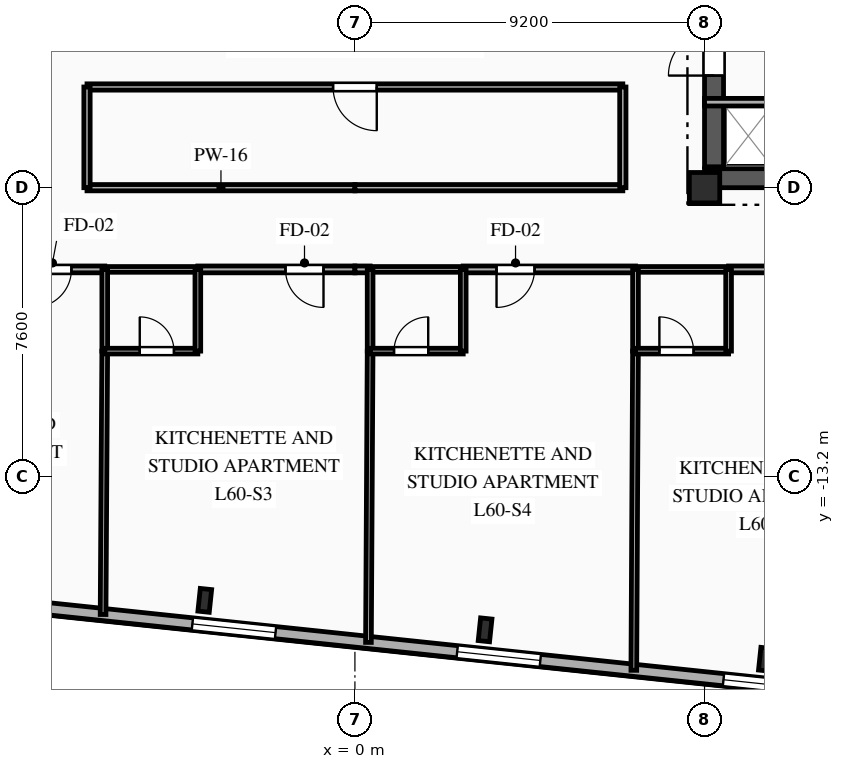
"""IFC4 building model, lengths in metres.
Left out: names, types, materials, properties, quantities, classifications, styles, units other than length and angle.
Written with IfcOpenShell. Run it as: python <this file> out.ifc"""

import sys

from ifc_helpers import new_model, si_unit, direction, frame, frame_2d, origin, origin_2d, place, context, subcontext, project, spatial, rectangle, i_section, extrude, element, fill, save


model = new_model("IFC4")
c1 = context("Model", 3, precision=1e-05, world=origin(), true_north=direction((0.0, 1.0)))
c2 = subcontext(c1, "Body", "Model", "MODEL_VIEW")
j1 = project(units=[si_unit("LENGTHUNIT", "METRE"), si_unit("PLANEANGLEUNIT", "RADIAN")], contexts=[c1])
p1 = place(None, origin())
s1 = spatial("IfcSite", under=j1, at=p1, CompositionType="ELEMENT")
p2 = place(p1, origin())
s2 = spatial("IfcBuilding", under=s1, at=p2, CompositionType="ELEMENT")
p3 = place(p2, frame((0.0, 0.0, 213.15)))
s3 = spatial("IfcBuildingStorey", under=s2, at=p3, CompositionType="ELEMENT", Elevation=213.15)
p4 = place(p3, frame((9.2, -5.6, 0.0), z_axis=(0.0, 0.0, 1.0), x_axis=(1.0, 0.0, 0.0)))
e1 = element("IfcColumn", 1, at=p4, inside=s3, PredefinedType="COLUMN", context=c2, shape_type="SweptSolid", body=[
    extrude(rectangle(XDim=0.8, YDim=0.8, at=origin_2d()), origin(), (0.0, 0.0, 1.0), 3.35),
])
for number, where, z_axis, x_axis in (
    (2, (-3.951, -16.458, 0.0), (0.0, 0.0, 1.0), (0.995, -0.105, 0.0)),
    (3, (3.425, -17.233, 0.0), (0.0, 0.0, 1.0), (0.995, -0.105, 0.0)),
    (4, (10.801, -18.009, 0.0), (0.0, 0.0, 1.0), (0.995, -0.105, 0.0)),
):
    element("IfcColumn", number, at=place(p3, frame(where, z_axis=z_axis, x_axis=x_axis)), inside=s3, PredefinedType="COLUMN", context=c2, shape_type="SweptSolid", body=[
        extrude(i_section(OverallWidth=0.3, OverallDepth=0.6, WebThickness=0.015, FlangeThickness=0.03, FilletRadius=0.027, at=origin_2d()), origin(), (0.0, 0.0, 1.0), 3.35),
    ])
p5 = place(p3, frame((18.756, -19.498, 0.0), z_axis=(0.0, 0.0, 1.0), x_axis=(-0.994522060044, 0.104526896475, 0.0)))
e5 = element("IfcWall", 5, at=p5, inside=s3, PredefinedType="SOLIDWALL", context=c2, shape_type="SweptSolid", body=[
    extrude(rectangle(XDim=45.8, YDim=0.32, at=frame_2d((22.9, 0.0))), origin(), (0.0, 0.0, 1.0), 3.04),
])
p6 = place(p5, frame((1.657, 0.0, 0.85)))
e6 = element("IfcOpeningElement", 6, at=p6, cuts=e5, PredefinedType="OPENING", context=c2, shape_type="SweptSolid", body=[
    extrude(rectangle(XDim=1.65, YDim=1.85, at=frame_2d((0.825, 0.925))), frame((0.0, 0.17, 0.0), z_axis=(0.0, -1.0, 0.0), x_axis=(1.0, 0.0, 0.0)), (0.0, 0.0, 1.0), 0.34),
])
p7 = place(p5, frame((6.907, 0.0, 0.85)))
e7 = element("IfcOpeningElement", 7, at=p7, cuts=e5, PredefinedType="OPENING", context=c2, shape_type="SweptSolid", body=[
    extrude(rectangle(XDim=2.2, YDim=1.85, at=frame_2d((1.1, 0.925))), frame((0.0, 0.17, 0.0), z_axis=(0.0, -1.0, 0.0), x_axis=(1.0, 0.0, 0.0)), (0.0, 0.0, 1.0), 0.34),
])
p8 = place(p5, frame((13.953, 0.0, 0.85)))
e8 = element("IfcOpeningElement", 8, at=p8, cuts=e5, PredefinedType="OPENING", context=c2, shape_type="SweptSolid", body=[
    extrude(rectangle(XDim=2.2, YDim=1.85, at=frame_2d((1.1, 0.925))), frame((0.0, 0.17, 0.0), z_axis=(0.0, -1.0, 0.0), x_axis=(1.0, 0.0, 0.0)), (0.0, 0.0, 1.0), 0.34),
])
p9 = place(p5, frame((20.959, 0.0, 0.85)))
e9 = element("IfcOpeningElement", 9, at=p9, cuts=e5, PredefinedType="OPENING", context=c2, shape_type="SweptSolid", body=[
    extrude(rectangle(XDim=2.2, YDim=1.85, at=frame_2d((1.1, 0.925))), frame((0.0, 0.17, 0.0), z_axis=(0.0, -1.0, 0.0), x_axis=(1.0, 0.0, 0.0)), (0.0, 0.0, 1.0), 0.34),
])
p10 = place(p5, frame((27.965, 0.0, 0.85)))
e10 = element("IfcOpeningElement", 10, at=p10, cuts=e5, PredefinedType="OPENING", context=c2, shape_type="SweptSolid", body=[
    extrude(rectangle(XDim=2.2, YDim=1.85, at=frame_2d((1.1, 0.925))), frame((0.0, 0.17, 0.0), z_axis=(0.0, -1.0, 0.0), x_axis=(1.0, 0.0, 0.0)), (0.0, 0.0, 1.0), 0.34),
])
p11 = place(p5, frame((35.487, 0.0, 0.85)))
e11 = element("IfcOpeningElement", 11, at=p11, cuts=e5, PredefinedType="OPENING", context=c2, shape_type="SweptSolid", body=[
    extrude(rectangle(XDim=1.65, YDim=1.85, at=frame_2d((0.825, 0.925))), frame((0.0, 0.17, 0.0), z_axis=(0.0, -1.0, 0.0), x_axis=(1.0, 0.0, 0.0)), (0.0, 0.0, 1.0), 0.34),
])
p12 = place(p5, frame((41.212, 0.0, 0.85)))
e12 = element("IfcOpeningElement", 12, at=p12, cuts=e5, PredefinedType="OPENING", context=c2, shape_type="SweptSolid", body=[
    extrude(rectangle(XDim=1.65, YDim=1.85, at=frame_2d((0.825, 0.925))), frame((0.0, 0.17, 0.0), z_axis=(0.0, -1.0, 0.0), x_axis=(1.0, 0.0, 0.0)), (0.0, 0.0, 1.0), 0.34),
])
p13 = place(p3, frame((9.2, -5.35, 0.0), z_axis=(0.0, 0.0, 1.0), x_axis=(1.0, 0.0, 0.0)))
e13 = element("IfcWall", 13, at=p13, inside=s3, PredefinedType="SHEAR", context=c2, shape_type="SweptSolid", body=[
    extrude(rectangle(XDim=9.6, YDim=0.5, at=frame_2d((4.8, 0.0))), origin(), (0.0, 0.0, 1.0), 3.04),
])
p14 = place(p13, frame((7.65, 0.0, 0.0)))
e14 = element("IfcOpeningElement", 14, at=p14, cuts=e13, PredefinedType="OPENING", context=c2, shape_type="SweptSolid", body=[
    extrude(rectangle(XDim=0.9, YDim=2.1, at=frame_2d((0.45, 1.05))), frame((0.0, 0.26, 0.0), z_axis=(0.0, -1.0, 0.0), x_axis=(1.0, 0.0, 0.0)), (0.0, 0.0, 1.0), 0.52),
])
p15 = place(p3, frame((9.45, -5.05, 0.0), z_axis=(0.0, 0.0, 1.0), x_axis=(0.0, 1.0, 0.0)))
e15 = element("IfcWall", 15, at=p15, inside=s3, PredefinedType="SHEAR", context=c2, shape_type="SweptSolid", body=[
    extrude(rectangle(XDim=10.1, YDim=0.5, at=frame_2d((5.05, 0.0))), origin(), (0.0, 0.0, 1.0), 3.04),
])
p16 = place(p15, frame((7.15, 0.0, 0.0)))
e16 = element("IfcOpeningElement", 16, at=p16, cuts=e15, PredefinedType="OPENING", context=c2, shape_type="SweptSolid", body=[
    extrude(rectangle(XDim=0.9, YDim=2.1, at=frame_2d((0.45, 1.05))), frame((0.0, 0.26, 0.0), z_axis=(0.0, -1.0, 0.0), x_axis=(1.0, 0.0, 0.0)), (0.0, 0.0, 1.0), 0.52),
])
p17 = place(p15, frame((2.4, 0.0, 0.0)))
e17 = element("IfcOpeningElement", 17, at=p17, cuts=e15, PredefinedType="OPENING", context=c2, shape_type="SweptSolid", body=[
    extrude(rectangle(XDim=1.2, YDim=2.15, at=frame_2d((0.6, 1.075))), frame((0.0, 0.26, 0.0), z_axis=(0.0, -1.0, 0.0), x_axis=(1.0, 0.0, 0.0)), (0.0, 0.0, 1.0), 0.52),
])
p18 = place(p3, frame((9.2, -3.35, 0.0), z_axis=(0.0, 0.0, 1.0), x_axis=(1.0, 0.0, 0.0)))
e18 = element("IfcWall", 18, at=p18, inside=s3, PredefinedType="PARTITIONING", context=c2, shape_type="SweptSolid", body=[
    extrude(rectangle(XDim=1.88, YDim=0.2, at=frame_2d((0.94, 0.0))), origin(), (0.0, 0.0, 1.0), 2.755),
])
p19 = place(p3, frame((-6.583, -7.75, 0.0), z_axis=(0.0, 0.0, 1.0), x_axis=(-1.0, 0.0, 0.0)))
e19 = element("IfcWall", 19, at=p19, inside=s3, PredefinedType="PARTITIONING", context=c2, shape_type="SweptSolid", body=[
    extrude(rectangle(XDim=4.534, YDim=0.18, at=frame_2d((2.267, 0.0))), origin(), (0.0, 0.0, 1.0), 3.04),
])
p20 = place(p19, frame((0.877, 0.0, 0.0)))
e20 = element("IfcOpeningElement", 20, at=p20, cuts=e19, PredefinedType="OPENING", context=c2, shape_type="SweptSolid", body=[
    extrude(rectangle(XDim=1.0, YDim=2.15, at=frame_2d((0.5, 1.075))), frame((0.0, 0.1, 0.0), z_axis=(0.0, -1.0, 0.0), x_axis=(1.0, 0.0, 0.0)), (0.0, 0.0, 1.0), 0.2),
])
p21 = place(p3, frame((0.0, -7.75, 0.0), z_axis=(0.0, 0.0, 1.0), x_axis=(-1.0, 0.0, 0.0)))
e21 = element("IfcWall", 21, at=p21, inside=s3, PredefinedType="PARTITIONING", context=c2, shape_type="SweptSolid", body=[
    extrude(rectangle(XDim=4.133, YDim=0.18, at=frame_2d((2.066, 0.0))), origin(), (0.0, 0.0, 1.0), 3.04),
])
p22 = place(p21, frame((0.827, 0.0, 0.0)))
e22 = element("IfcOpeningElement", 22, at=p22, cuts=e21, PredefinedType="OPENING", context=c2, shape_type="SweptSolid", body=[
    extrude(rectangle(XDim=1.0, YDim=2.15, at=frame_2d((0.5, 1.075))), frame((0.0, 0.1, 0.0), z_axis=(0.0, -1.0, 0.0), x_axis=(1.0, 0.0, 0.0)), (0.0, 0.0, 1.0), 0.2),
])
p23 = place(p3, frame((-4.133, -7.75, 0.0), z_axis=(0.0, 0.0, 1.0), x_axis=(-1.0, 0.0, 0.0)))
e23 = element("IfcWall", 23, at=p23, inside=s3, PredefinedType="PLUMBINGWALL", context=c2, shape_type="SweptSolid", body=[
    extrude(rectangle(XDim=2.45, YDim=0.15, at=frame_2d((1.225, 0.0))), origin(), (0.0, 0.0, 1.0), 3.04),
])
p24 = place(p3, frame((-7.05, -5.6, 0.0), z_axis=(0.0, 0.0, 1.0), x_axis=(1.0, 0.0, 0.0)))
e24 = element("IfcWall", 24, at=p24, inside=s3, PredefinedType="PARTITIONING", context=c2, shape_type="SweptSolid", body=[
    extrude(rectangle(XDim=7.05, YDim=0.165, at=frame_2d((3.525, 0.0))), origin(), (0.0, 0.0, 1.0), 2.525),
])
p25 = place(p3, frame((0.4, -7.75, 0.0), z_axis=(0.0, 0.0, 1.0), x_axis=(-1.0, 0.0, 0.0)))
e25 = element("IfcWall", 25, at=p25, inside=s3, PredefinedType="PARTITIONING", context=c2, shape_type="SweptSolid", body=[
    extrude(rectangle(XDim=0.4, YDim=0.18, at=frame_2d((0.2, 0.0))), origin(), (0.0, 0.0, 1.0), 3.04),
])
p26 = place(p3, frame((7.383, -7.75, 0.0), z_axis=(0.0, 0.0, 1.0), x_axis=(-1.0, 0.0, 0.0)))
e26 = element("IfcWall", 26, at=p26, inside=s3, PredefinedType="PARTITIONING", context=c2, shape_type="SweptSolid", body=[
    extrude(rectangle(XDim=4.533, YDim=0.18, at=frame_2d((2.267, 0.0))), origin(), (0.0, 0.0, 1.0), 3.04),
])
p27 = place(p26, frame((2.656, 0.0, 0.0)))
e27 = element("IfcOpeningElement", 27, at=p27, cuts=e26, PredefinedType="OPENING", context=c2, shape_type="SweptSolid", body=[
    extrude(rectangle(XDim=1.0, YDim=2.15, at=frame_2d((0.5, 1.075))), frame((0.0, 0.1, 0.0), z_axis=(0.0, -1.0, 0.0), x_axis=(1.0, 0.0, 0.0)), (0.0, 0.0, 1.0), 0.2),
])
p28 = place(p3, frame((2.85, -7.75, 0.0), z_axis=(0.0, 0.0, 1.0), x_axis=(-1.0, 0.0, 0.0)))
e28 = element("IfcWall", 28, at=p28, inside=s3, PredefinedType="PLUMBINGWALL", context=c2, shape_type="SweptSolid", body=[
    extrude(rectangle(XDim=2.45, YDim=0.15, at=frame_2d((1.225, 0.0))), origin(), (0.0, 0.0, 1.0), 3.04),
])
p29 = place(p3, frame((14.367, -7.75, 0.0), z_axis=(0.0, 0.0, 1.0), x_axis=(-1.0, 0.0, 0.0)))
e29 = element("IfcWall", 29, at=p29, inside=s3, PredefinedType="PARTITIONING", context=c2, shape_type="SweptSolid", body=[
    extrude(rectangle(XDim=4.534, YDim=0.18, at=frame_2d((2.267, 0.0))), origin(), (0.0, 0.0, 1.0), 3.04),
])
p30 = place(p29, frame((0.877, 0.0, 0.0)))
e30 = element("IfcOpeningElement", 30, at=p30, cuts=e29, PredefinedType="OPENING", context=c2, shape_type="SweptSolid", body=[
    extrude(rectangle(XDim=1.0, YDim=2.15, at=frame_2d((0.5, 1.075))), frame((0.0, 0.1, 0.0), z_axis=(0.0, -1.0, 0.0), x_axis=(1.0, 0.0, 0.0)), (0.0, 0.0, 1.0), 0.2),
])
p31 = place(p3, frame((9.833, -7.75, 0.0), z_axis=(0.0, 0.0, 1.0), x_axis=(-1.0, 0.0, 0.0)))
e31 = element("IfcWall", 31, at=p31, inside=s3, PredefinedType="PLUMBINGWALL", context=c2, shape_type="SweptSolid", body=[
    extrude(rectangle(XDim=2.45, YDim=0.15, at=frame_2d((1.225, 0.0))), origin(), (0.0, 0.0, 1.0), 3.04),
])
p32 = place(p3, frame((0.0, -5.6, 0.0), z_axis=(0.0, 0.0, 1.0), x_axis=(1.0, 0.0, 0.0)))
e32 = element("IfcWall", 32, at=p32, inside=s3, PredefinedType="PARTITIONING", context=c2, shape_type="SweptSolid", body=[
    extrude(rectangle(XDim=7.05, YDim=0.165, at=frame_2d((3.525, 0.0))), origin(), (0.0, 0.0, 1.0), 2.525),
])
p33 = place(p3, frame((7.05, -2.95, 0.0), z_axis=(0.0, 0.0, 1.0), x_axis=(-1.0, 0.0, 0.0)))
e33 = element("IfcWall", 33, at=p33, inside=s3, PredefinedType="PARTITIONING", context=c2, shape_type="SweptSolid", body=[
    extrude(rectangle(XDim=14.1, YDim=0.165, at=frame_2d((7.05, 0.0))), origin(), (0.0, 0.0, 1.0), 3.04),
])
p34 = place(p33, frame((6.475, 0.0, 0.0)))
e34 = element("IfcOpeningElement", 34, at=p34, cuts=e33, PredefinedType="OPENING", context=c2, shape_type="SweptSolid", body=[
    extrude(rectangle(XDim=1.15, YDim=2.15, at=frame_2d((0.575, 1.075))), frame((0.0, 0.093, 0.0), z_axis=(0.0, -1.0, 0.0), x_axis=(1.0, 0.0, 0.0)), (0.0, 0.0, 1.0), 0.185),
])
for number, where, z_axis, x_axis in (
    (35, (-7.05, -2.95, 0.0), (0.0, 0.0, 1.0), (0.0, -1.0, 0.0)),
    (36, (7.05, -5.6, 0.0), (0.0, 0.0, 1.0), (0.0, 1.0, 0.0)),
):
    element("IfcWall", number, at=place(p3, frame(where, z_axis=z_axis, x_axis=x_axis)), inside=s3, PredefinedType="PARTITIONING", context=c2, shape_type="SweptSolid", body=[
        extrude(rectangle(XDim=2.65, YDim=0.165, at=frame_2d((1.325, 0.0))), origin(), (0.0, 0.0, 1.0), 3.04),
    ])
p35 = place(p3, frame((-6.583, -9.9, 0.0), z_axis=(0.0, 0.0, 1.0), x_axis=(-0.006340579882, -0.999979898321, 0.0)))
e37 = element("IfcWall", 37, at=p35, inside=s3, PredefinedType="PARTITIONING", context=c2, shape_type="SweptSolid", body=[
    extrude(rectangle(XDim=6.931, YDim=0.15, at=frame_2d((3.465, 0.0))), origin(), (0.0, 0.0, 1.0), 3.04),
])
p36 = place(p3, frame((-6.583, -7.75, 0.0), z_axis=(0.0, 0.0, 1.0), x_axis=(0.0, -1.0, 0.0)))
e38 = element("IfcWall", 38, at=p36, inside=s3, PredefinedType="PLUMBINGWALL", context=c2, shape_type="SweptSolid", body=[
    extrude(rectangle(XDim=2.15, YDim=0.15, at=frame_2d((1.075, 0.0))), origin(), (0.0, 0.0, 1.0), 3.04),
])
p37 = place(p3, frame((-6.583, -9.9, 0.0), z_axis=(0.0, 0.0, 1.0), x_axis=(1.0, 0.0, 0.0)))
e39 = element("IfcWall", 39, at=p37, inside=s3, PredefinedType="PLUMBINGWALL", context=c2, shape_type="SweptSolid", body=[
    extrude(rectangle(XDim=2.45, YDim=0.15, at=frame_2d((1.225, 0.0))), origin(), (0.0, 0.0, 1.0), 3.04),
])
p38 = place(p37, frame((0.921, 0.0, 0.0)))
e40 = element("IfcOpeningElement", 40, at=p38, cuts=e39, PredefinedType="OPENING", context=c2, shape_type="SweptSolid", body=[
    extrude(rectangle(XDim=0.9, YDim=2.1, at=frame_2d((0.45, 1.05))), frame((0.0, 0.085, 0.0), z_axis=(0.0, -1.0, 0.0), x_axis=(1.0, 0.0, 0.0)), (0.0, 0.0, 1.0), 0.17),
])
p39 = place(p3, frame((-4.133, -9.9, 0.0), z_axis=(0.0, 0.0, 1.0), x_axis=(0.0, 1.0, 0.0)))
e41 = element("IfcWall", 41, at=p39, inside=s3, PredefinedType="PLUMBINGWALL", context=c2, shape_type="SweptSolid", body=[
    extrude(rectangle(XDim=2.15, YDim=0.15, at=frame_2d((1.075, 0.0))), origin(), (0.0, 0.0, 1.0), 3.04),
])
p40 = place(p3, frame((0.4, -9.9, 0.0), z_axis=(0.0, 0.0, 1.0), x_axis=(-0.005701633766, -0.999983745554, 0.0)))
e42 = element("IfcWall", 42, at=p40, inside=s3, PredefinedType="PARTITIONING", context=c2, shape_type="SweptSolid", body=[
    extrude(rectangle(XDim=7.665, YDim=0.15, at=frame_2d((3.833, 0.0))), origin(), (0.0, 0.0, 1.0), 3.04),
])
p41 = place(p3, frame((0.4, -7.75, 0.0), z_axis=(0.0, 0.0, 1.0), x_axis=(0.0, -1.0, 0.0)))
e43 = element("IfcWall", 43, at=p41, inside=s3, PredefinedType="PLUMBINGWALL", context=c2, shape_type="SweptSolid", body=[
    extrude(rectangle(XDim=2.15, YDim=0.15, at=frame_2d((1.075, 0.0))), origin(), (0.0, 0.0, 1.0), 3.04),
])
p42 = place(p3, frame((0.4, -9.9, 0.0), z_axis=(0.0, 0.0, 1.0), x_axis=(1.0, 0.0, 0.0)))
e44 = element("IfcWall", 44, at=p42, inside=s3, PredefinedType="PLUMBINGWALL", context=c2, shape_type="SweptSolid", body=[
    extrude(rectangle(XDim=2.45, YDim=0.15, at=frame_2d((1.225, 0.0))), origin(), (0.0, 0.0, 1.0), 3.04),
])
p43 = place(p42, frame((0.629, 0.0, 0.0)))
e45 = element("IfcOpeningElement", 45, at=p43, cuts=e44, PredefinedType="OPENING", context=c2, shape_type="SweptSolid", body=[
    extrude(rectangle(XDim=0.9, YDim=2.1, at=frame_2d((0.45, 1.05))), frame((0.0, 0.085, 0.0), z_axis=(0.0, -1.0, 0.0), x_axis=(1.0, 0.0, 0.0)), (0.0, 0.0, 1.0), 0.17),
])
p44 = place(p3, frame((2.85, -9.9, 0.0), z_axis=(0.0, 0.0, 1.0), x_axis=(0.0, 1.0, 0.0)))
e46 = element("IfcWall", 46, at=p44, inside=s3, PredefinedType="PLUMBINGWALL", context=c2, shape_type="SweptSolid", body=[
    extrude(rectangle(XDim=2.15, YDim=0.15, at=frame_2d((1.075, 0.0))), origin(), (0.0, 0.0, 1.0), 3.04),
])
p45 = place(p3, frame((7.383, -9.9, 0.0), z_axis=(0.0, 0.0, 1.0), x_axis=(-0.00523233441, -0.999986311245, 0.0)))
e47 = element("IfcWall", 47, at=p45, inside=s3, PredefinedType="PARTITIONING", context=c2, shape_type="SweptSolid", body=[
    extrude(rectangle(XDim=8.399, YDim=0.15, at=frame_2d((4.199, 0.0))), origin(), (0.0, 0.0, 1.0), 3.04),
])
p46 = place(p3, frame((7.383, -7.75, 0.0), z_axis=(0.0, 0.0, 1.0), x_axis=(0.0, -1.0, 0.0)))
e48 = element("IfcWall", 48, at=p46, inside=s3, PredefinedType="PLUMBINGWALL", context=c2, shape_type="SweptSolid", body=[
    extrude(rectangle(XDim=2.15, YDim=0.15, at=frame_2d((1.075, 0.0))), origin(), (0.0, 0.0, 1.0), 3.04),
])
p47 = place(p3, frame((7.383, -9.9, 0.0), z_axis=(0.0, 0.0, 1.0), x_axis=(1.0, 0.0, 0.0)))
e49 = element("IfcWall", 49, at=p47, inside=s3, PredefinedType="PLUMBINGWALL", context=c2, shape_type="SweptSolid", body=[
    extrude(rectangle(XDim=2.45, YDim=0.15, at=frame_2d((1.225, 0.0))), origin(), (0.0, 0.0, 1.0), 3.04),
])
p48 = place(p47, frame((0.629, 0.0, 0.0)))
e50 = element("IfcOpeningElement", 50, at=p48, cuts=e49, PredefinedType="OPENING", context=c2, shape_type="SweptSolid", body=[
    extrude(rectangle(XDim=0.9, YDim=2.1, at=frame_2d((0.45, 1.05))), frame((0.0, 0.085, 0.0), z_axis=(0.0, -1.0, 0.0), x_axis=(1.0, 0.0, 0.0)), (0.0, 0.0, 1.0), 0.17),
])
p49 = place(p3, frame((9.833, -9.9, 0.0), z_axis=(0.0, 0.0, 1.0), x_axis=(0.0, 1.0, 0.0)))
e51 = element("IfcWall", 51, at=p49, inside=s3, PredefinedType="PLUMBINGWALL", context=c2, shape_type="SweptSolid", body=[
    extrude(rectangle(XDim=2.15, YDim=0.15, at=frame_2d((1.075, 0.0))), origin(), (0.0, 0.0, 1.0), 3.04),
])
p50 = place(p7, origin())
e52 = element("IfcWindow", 52, at=p50, inside=s3, PartitioningType="SINGLE_PANEL", PredefinedType="WINDOW", context=c2, shape_type="SweptSolid", body=[
    extrude(rectangle(XDim=2.2, YDim=1.85, at=frame_2d((1.1, 0.925))), frame((0.0, 0.03, 0.0), z_axis=(0.0, -1.0, 0.0), x_axis=(1.0, 0.0, 0.0)), (0.0, 0.0, 1.0), 0.06),
])
fill(e7, e52)
p51 = place(p8, origin())
e53 = element("IfcWindow", 53, at=p51, inside=s3, PartitioningType="SINGLE_PANEL", PredefinedType="WINDOW", context=c2, shape_type="SweptSolid", body=[
    extrude(rectangle(XDim=2.2, YDim=1.85, at=frame_2d((1.1, 0.925))), frame((0.0, 0.03, 0.0), z_axis=(0.0, -1.0, 0.0), x_axis=(1.0, 0.0, 0.0)), (0.0, 0.0, 1.0), 0.06),
])
fill(e8, e53)
p52 = place(p9, origin())
e54 = element("IfcWindow", 54, at=p52, inside=s3, PartitioningType="SINGLE_PANEL", PredefinedType="WINDOW", context=c2, shape_type="SweptSolid", body=[
    extrude(rectangle(XDim=2.2, YDim=1.85, at=frame_2d((1.1, 0.925))), frame((0.0, 0.03, 0.0), z_axis=(0.0, -1.0, 0.0), x_axis=(1.0, 0.0, 0.0)), (0.0, 0.0, 1.0), 0.06),
])
fill(e9, e54)
p53 = place(p17, origin())
e55 = element("IfcDoor", 55, at=p53, inside=s3, OperationType="SINGLE_SWING_LEFT", PredefinedType="DOOR", context=c2, shape_type="SweptSolid", body=[
    extrude(rectangle(XDim=1.2, YDim=2.15, at=frame_2d((0.6, 1.075))), frame((0.0, 0.025, 0.0), z_axis=(0.0, -1.0, 0.0), x_axis=(1.0, 0.0, 0.0)), (0.0, 0.0, 1.0), 0.05),
])
fill(e17, e55)
p54 = place(p20, origin())
e56 = element("IfcDoor", 56, at=p54, inside=s3, OperationType="SINGLE_SWING_RIGHT", PredefinedType="DOOR", context=c2, shape_type="SweptSolid", body=[
    extrude(rectangle(XDim=1.0, YDim=2.15, at=frame_2d((0.5, 1.075))), frame((0.0, 0.025, 0.0), z_axis=(0.0, -1.0, 0.0), x_axis=(1.0, 0.0, 0.0)), (0.0, 0.0, 1.0), 0.05),
])
fill(e20, e56)
p55 = place(p22, origin())
e57 = element("IfcDoor", 57, at=p55, inside=s3, OperationType="SINGLE_SWING_LEFT", PredefinedType="DOOR", context=c2, shape_type="SweptSolid", body=[
    extrude(rectangle(XDim=1.0, YDim=2.15, at=frame_2d((0.5, 1.075))), frame((0.0, 0.025, 0.0), z_axis=(0.0, -1.0, 0.0), x_axis=(1.0, 0.0, 0.0)), (0.0, 0.0, 1.0), 0.05),
])
fill(e22, e57)
p56 = place(p27, origin())
e58 = element("IfcDoor", 58, at=p56, inside=s3, OperationType="SINGLE_SWING_RIGHT", PredefinedType="DOOR", context=c2, shape_type="SweptSolid", body=[
    extrude(rectangle(XDim=1.0, YDim=2.15, at=frame_2d((0.5, 1.075))), frame((0.0, 0.025, 0.0), z_axis=(0.0, -1.0, 0.0), x_axis=(1.0, 0.0, 0.0)), (0.0, 0.0, 1.0), 0.05),
])
fill(e27, e58)
p57 = place(p34, origin())
e59 = element("IfcDoor", 59, at=p57, inside=s3, OperationType="SINGLE_SWING_LEFT", PredefinedType="DOOR", context=c2, shape_type="SweptSolid", body=[
    extrude(rectangle(XDim=1.15, YDim=2.15, at=frame_2d((0.575, 1.075))), frame((0.0, 0.025, 0.0), z_axis=(0.0, -1.0, 0.0), x_axis=(1.0, 0.0, 0.0)), (0.0, 0.0, 1.0), 0.05),
])
fill(e34, e59)
p58 = place(p38, origin())
e60 = element("IfcDoor", 60, at=p58, inside=s3, OperationType="SINGLE_SWING_LEFT", PredefinedType="DOOR", context=c2, shape_type="SweptSolid", body=[
    extrude(rectangle(XDim=0.9, YDim=2.1, at=frame_2d((0.45, 1.05))), frame((0.0, 0.025, 0.0), z_axis=(0.0, -1.0, 0.0), x_axis=(1.0, 0.0, 0.0)), (0.0, 0.0, 1.0), 0.05),
])
fill(e40, e60)
p59 = place(p43, origin())
e61 = element("IfcDoor", 61, at=p59, inside=s3, OperationType="SINGLE_SWING_RIGHT", PredefinedType="DOOR", context=c2, shape_type="SweptSolid", body=[
    extrude(rectangle(XDim=0.9, YDim=2.1, at=frame_2d((0.45, 1.05))), frame((0.0, 0.025, 0.0), z_axis=(0.0, -1.0, 0.0), x_axis=(1.0, 0.0, 0.0)), (0.0, 0.0, 1.0), 0.05),
])
fill(e45, e61)
p60 = place(p48, origin())
e62 = element("IfcDoor", 62, at=p60, inside=s3, OperationType="SINGLE_SWING_LEFT", PredefinedType="DOOR", context=c2, shape_type="SweptSolid", body=[
    extrude(rectangle(XDim=0.9, YDim=2.1, at=frame_2d((0.45, 1.05))), frame((0.0, 0.025, 0.0), z_axis=(0.0, -1.0, 0.0), x_axis=(1.0, 0.0, 0.0)), (0.0, 0.0, 1.0), 0.05),
])
fill(e50, e62)
save(model, sys.argv[1])
